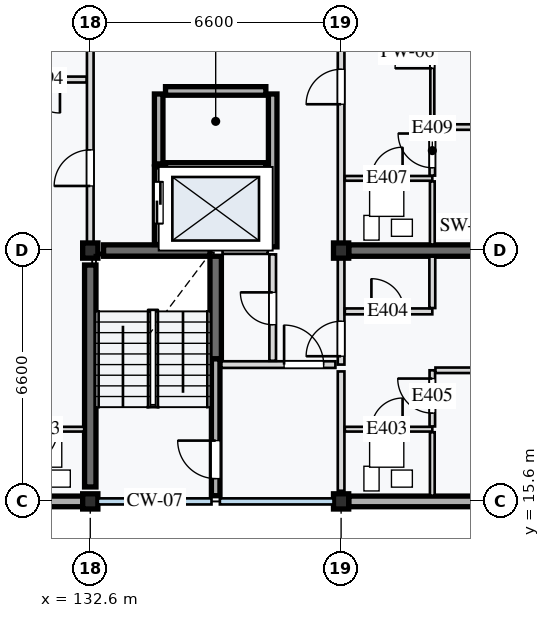
"""IFC4 building model, lengths in metres.
Left out: names, types, materials, properties, quantities, classifications, styles, units other than length and angle.
Written with IfcOpenShell. Run it as: python <this file> out.ifc"""

import sys

from ifc_helpers import new_model, si_unit, direction, frame, frame_2d, origin, origin_2d, place, context, subcontext, project, spatial, rectangle, extrude, element, fill, save


model = new_model("IFC4")
c1 = context("Model", 3, precision=1e-05, world=origin(), true_north=direction((0.0, 1.0)))
c2 = subcontext(c1, "Body", "Model", "MODEL_VIEW")
j1 = project(units=[si_unit("LENGTHUNIT", "METRE"), si_unit("PLANEANGLEUNIT", "RADIAN")], contexts=[c1])
p1 = place(None, origin())
s1 = spatial("IfcSite", under=j1, at=p1, CompositionType="ELEMENT")
p2 = place(p1, origin())
s2 = spatial("IfcBuilding", under=s1, at=p2, CompositionType="ELEMENT")
p3 = place(p2, frame((0.0, 0.0, 34.0)))
s3 = spatial("IfcBuildingStorey", under=s2, at=p3, CompositionType="ELEMENT", Elevation=34.0)
for number, where, z_axis, x_axis in (
    (1, (132.6, 15.6, 0.0), (0.0, 0.0, 1.0), (1.0, 0.0, 0.0)),
    (2, (139.2, 15.6, 0.0), (0.0, 0.0, 1.0), (1.0, 0.0, 0.0)),
    (3, (132.6, 22.2, 0.0), (0.0, 0.0, 1.0), (1.0, 0.0, 0.0)),
    (4, (139.2, 22.2, 0.0), (0.0, 0.0, 1.0), (1.0, 0.0, 0.0)),
):
    element("IfcColumn", number, at=place(p3, frame(where, z_axis=z_axis, x_axis=x_axis)), inside=s3, PredefinedType="COLUMN", context=c2, shape_type="SweptSolid", body=[
        extrude(rectangle(XDim=0.4, YDim=0.4, at=origin_2d()), origin(), (0.0, 0.0, 1.0), 3.2),
    ])
p4 = place(p3, frame((132.6, 15.98, 0.0), z_axis=(0.0, 0.0, 1.0), x_axis=(0.0, 1.0, 0.0)))
e5 = element("IfcWall", 5, at=p4, inside=s3, PredefinedType="SHEAR", context=c2, shape_type="SweptSolid", body=[
    extrude(rectangle(XDim=5.84, YDim=0.3, at=frame_2d((2.92, 0.0))), origin(), (0.0, 0.0, 1.0), 2.97),
])
p5 = place(p3, frame((135.9, 19.35, 0.0), z_axis=(0.0, 0.0, 1.0), x_axis=(0.0, 1.0, 0.0)))
e6 = element("IfcWall", 6, at=p5, inside=s3, PredefinedType="SHEAR", context=c2, shape_type="SweptSolid", body=[
    extrude(rectangle(XDim=2.7, YDim=0.3, at=frame_2d((1.35, 0.0))), origin(), (0.0, 0.0, 1.0), 2.97),
])
p6 = place(p3, frame((132.95, 22.2, 0.0), z_axis=(0.0, 0.0, 1.0), x_axis=(1.0, 0.0, 0.0)))
e7 = element("IfcWall", 7, at=p6, inside=s3, PredefinedType="SHEAR", context=c2, shape_type="SweptSolid", body=[
    extrude(rectangle(XDim=2.8, YDim=0.3, at=frame_2d((1.4, 0.0))), origin(), (0.0, 0.0, 1.0), 2.97),
])
p7 = place(p3, frame((139.4, 22.2, 0.0), z_axis=(0.0, 0.0, 1.0), x_axis=(1.0, 0.0, 0.0)))
e8 = element("IfcWall", 8, at=p7, inside=s3, PredefinedType="SHEAR", context=c2, shape_type="SweptSolid", body=[
    extrude(rectangle(XDim=6.2, YDim=0.3, at=frame_2d((3.1, 0.0))), origin(), (0.0, 0.0, 1.0), 2.97),
])
p8 = place(p3, frame((126.2, 15.6, 0.0), z_axis=(0.0, 0.0, 1.0), x_axis=(1.0, 0.0, 0.0)))
e9 = element("IfcWall", 9, at=p8, inside=s3, PredefinedType="STANDARD", context=c2, shape_type="SweptSolid", body=[
    extrude(rectangle(XDim=6.2, YDim=0.28, at=frame_2d((3.1, 0.0))), origin(), (0.0, 0.0, 1.0), 2.65),
])
p9 = place(p3, frame((139.4, 15.6, 0.0), z_axis=(0.0, 0.0, 1.0), x_axis=(1.0, 0.0, 0.0)))
e10 = element("IfcWall", 10, at=p9, inside=s3, PredefinedType="STANDARD", context=c2, shape_type="SweptSolid", body=[
    extrude(rectangle(XDim=6.2, YDim=0.28, at=frame_2d((3.1, 0.0))), origin(), (0.0, 0.0, 1.0), 2.65),
])
p10 = place(p3, frame((135.9, 15.75, 0.0), z_axis=(0.0, 0.0, 1.0), x_axis=(0.0, 1.0, 0.0)))
e11 = element("IfcWall", 11, at=p10, inside=s3, PredefinedType="STANDARD", context=c2, shape_type="SweptSolid", body=[
    extrude(rectangle(XDim=3.6, YDim=0.225, at=frame_2d((1.8, 0.0))), origin(), (0.0, 0.0, 1.0), 2.935),
])
p11 = place(p10, frame((0.45, 0.0, 0.0)))
e12 = element("IfcOpeningElement", 12, at=p11, cuts=e11, PredefinedType="OPENING", context=c2, shape_type="SweptSolid", body=[
    extrude(rectangle(XDim=1.0, YDim=2.16, at=frame_2d((0.5, 1.08))), frame((0.0, 0.123, 0.0), z_axis=(0.0, -1.0, 0.0), x_axis=(1.0, 0.0, 0.0)), (0.0, 0.0, 1.0), 0.245),
])
p12 = place(p3, frame((136.05, 19.2, 0.0), z_axis=(0.0, 0.0, 1.0), x_axis=(1.0, 0.0, 0.0)))
e13 = element("IfcWall", 13, at=p12, inside=s3, PredefinedType="PARTITIONING", context=c2, shape_type="SweptSolid", body=[
    extrude(rectangle(XDim=3.0, YDim=0.175, at=frame_2d((1.5, 0.0))), origin(), (0.0, 0.0, 1.0), 2.935),
])
p13 = place(p12, frame((1.65, 0.0, 0.0)))
e14 = element("IfcOpeningElement", 14, at=p13, cuts=e13, PredefinedType="OPENING", context=c2, shape_type="SweptSolid", body=[
    extrude(rectangle(XDim=1.04, YDim=2.12, at=frame_2d((0.52, 1.06))), frame((0.0, 0.097, 0.0), z_axis=(0.0, -1.0, 0.0), x_axis=(1.0, 0.0, 0.0)), (0.0, 0.0, 1.0), 0.195),
])
p14 = place(p3, frame((137.4, 19.3, 0.0), z_axis=(0.0, 0.0, 1.0), x_axis=(0.0, 1.0, 0.0)))
e15 = element("IfcWall", 15, at=p14, inside=s3, PredefinedType="PARTITIONING", context=c2, shape_type="SweptSolid", body=[
    extrude(rectangle(XDim=2.8, YDim=0.175, at=frame_2d((1.4, 0.0))), origin(), (0.0, 0.0, 1.0), 2.935),
])
p15 = place(p14, frame((0.95, 0.0, 0.0)))
e16 = element("IfcOpeningElement", 16, at=p15, cuts=e15, PredefinedType="OPENING", context=c2, shape_type="SweptSolid", body=[
    extrude(rectangle(XDim=0.85, YDim=2.0, at=frame_2d((0.425, 1.0))), frame((0.0, 0.097, 0.0), z_axis=(0.0, -1.0, 0.0), x_axis=(1.0, 0.0, 0.0)), (0.0, 0.0, 1.0), 0.195),
])
p16 = place(p3, frame((136.08, 22.2, 0.0), z_axis=(0.0, 0.0, 1.0), x_axis=(1.0, 0.0, 0.0)))
e17 = element("IfcWall", 17, at=p16, inside=s3, PredefinedType="PARTITIONING", context=c2, shape_type="SweptSolid", body=[
    extrude(rectangle(XDim=1.19, YDim=0.175, at=frame_2d((0.595, 0.0))), origin(), (0.0, 0.0, 1.0), 2.935),
])
p17 = place(p3, frame((134.4, 22.36, 0.0), z_axis=(0.0, 0.0, 1.0), x_axis=(0.0, 1.0, 0.0)))
e18 = element("IfcWall", 18, at=p17, inside=s3, PredefinedType="STANDARD", context=c2, shape_type="SweptSolid", body=[
    extrude(rectangle(XDim=2.04, YDim=0.225, at=frame_2d((1.02, 0.0))), origin(), (0.0, 0.0, 1.0), 2.935),
])
p18 = place(p17, frame((0.55, 0.0, 0.0)))
e19 = element("IfcOpeningElement", 19, at=p18, cuts=e18, PredefinedType="OPENING", context=c2, shape_type="SweptSolid", body=[
    extrude(rectangle(XDim=1.1, YDim=2.1, at=frame_2d((0.55, 1.05))), frame((0.0, 0.123, 0.0), z_axis=(0.0, -1.0, 0.0), x_axis=(1.0, 0.0, 0.0)), (0.0, 0.0, 1.0), 0.245),
])
p19 = place(p3, frame((134.4, 24.48, 0.0), z_axis=(0.0, 0.0, 1.0), x_axis=(0.0, 1.0, 0.0)))
e20 = element("IfcWall", 20, at=p19, inside=s3, PredefinedType="STANDARD", context=c2, shape_type="SweptSolid", body=[
    extrude(rectangle(XDim=1.84, YDim=0.225, at=frame_2d((0.92, 0.0))), origin(), (0.0, 0.0, 1.0), 2.935),
])
p20 = place(p3, frame((137.4, 22.298, 0.0), z_axis=(0.0, 0.0, 1.0), x_axis=(0.0, 1.0, 0.0)))
e21 = element("IfcWall", 21, at=p20, inside=s3, PredefinedType="STANDARD", context=c2, shape_type="SweptSolid", body=[
    extrude(rectangle(XDim=4.022, YDim=0.225, at=frame_2d((2.011, 0.0))), origin(), (0.0, 0.0, 1.0), 2.935),
])
for number, where, z_axis, x_axis in (
    (22, (134.58, 24.4, 0.0), (0.0, 0.0, 1.0), (1.0, 0.0, 0.0)),
    (23, (134.58, 26.4, 0.0), (0.0, 0.0, 1.0), (1.0, 0.0, 0.0)),
):
    element("IfcWall", number, at=place(p3, frame(where, z_axis=z_axis, x_axis=x_axis)), inside=s3, PredefinedType="STANDARD", context=c2, shape_type="SweptSolid", body=[
        extrude(rectangle(XDim=2.64, YDim=0.225, at=frame_2d((1.32, 0.0))), origin(), (0.0, 0.0, 1.0), 2.935),
    ])
p21 = place(p3, frame((132.6, 22.2, 0.0), z_axis=(0.0, 0.0, 1.0), x_axis=(0.0, 1.0, 0.0)))
e24 = element("IfcWall", 24, at=p21, inside=s3, PredefinedType="PARTITIONING", context=c2, shape_type="SweptSolid", body=[
    extrude(rectangle(XDim=6.6, YDim=0.175, at=frame_2d((3.3, 0.0))), origin(), (0.0, 0.0, 1.0), 2.7),
])
p22 = place(p21, frame((1.7, 0.0, 0.0)))
e25 = element("IfcOpeningElement", 25, at=p22, cuts=e24, PredefinedType="OPENING", context=c2, shape_type="SweptSolid", body=[
    extrude(rectangle(XDim=0.95, YDim=2.1, at=frame_2d((0.475, 1.05))), frame((0.0, 0.097, 0.0), z_axis=(0.0, -1.0, 0.0), x_axis=(1.0, 0.0, 0.0)), (0.0, 0.0, 1.0), 0.195),
])
p23 = place(p3, frame((132.44, 17.5, 0.0), z_axis=(0.0, 0.0, 1.0), x_axis=(-1.0, 0.0, 0.0)))
e26 = element("IfcWall", 26, at=p23, inside=s3, PredefinedType="PARTITIONING", context=c2, shape_type="SweptSolid", body=[
    extrude(rectangle(XDim=2.24, YDim=0.125, at=frame_2d((1.12, 0.0))), origin(), (0.0, 0.0, 1.0), 2.935),
])
p24 = place(p23, frame((0.7, 0.0, 0.0)))
e27 = element("IfcOpeningElement", 27, at=p24, cuts=e26, PredefinedType="OPENING", context=c2, shape_type="SweptSolid", body=[
    extrude(rectangle(XDim=0.94, YDim=2.08, at=frame_2d((0.47, 1.04))), frame((0.0, 0.073, 0.0), z_axis=(0.0, -1.0, 0.0), x_axis=(1.0, 0.0, 0.0)), (0.0, 0.0, 1.0), 0.145),
])
p25 = place(p3, frame((132.502, 26.7, 0.0), z_axis=(0.0, 0.0, 1.0), x_axis=(-1.0, 0.0, 0.0)))
e28 = element("IfcWall", 28, at=p25, inside=s3, PredefinedType="PARTITIONING", context=c2, shape_type="SweptSolid", body=[
    extrude(rectangle(XDim=2.302, YDim=0.155, at=frame_2d((1.151, 0.0))), origin(), (0.0, 0.0, 1.0), 2.935),
])
p26 = place(p25, frame((0.7, 0.0, 0.0)))
e29 = element("IfcOpeningElement", 29, at=p26, cuts=e28, PredefinedType="OPENING", context=c2, shape_type="SweptSolid", body=[
    extrude(rectangle(XDim=0.88, YDim=2.16, at=frame_2d((0.44, 1.08))), frame((0.0, 0.087, 0.0), z_axis=(0.0, -1.0, 0.0), x_axis=(1.0, 0.0, 0.0)), (0.0, 0.0, 1.0), 0.175),
])
p27 = place(p3, frame((139.2, 15.88, 0.0), z_axis=(0.0, 0.0, 1.0), x_axis=(0.0, 1.0, 0.0)))
e30 = element("IfcWall", 30, at=p27, inside=s3, PredefinedType="PARTITIONING", context=c2, shape_type="SweptSolid", body=[
    extrude(rectangle(XDim=3.14, YDim=0.175, at=frame_2d((1.57, 0.0))), origin(), (0.0, 0.0, 1.0), 2.7),
])
p28 = place(p3, frame((139.2, 19.2, 0.0), z_axis=(0.0, 0.0, 1.0), x_axis=(0.0, 1.0, 0.0)))
e31 = element("IfcWall", 31, at=p28, inside=s3, PredefinedType="PARTITIONING", context=c2, shape_type="SweptSolid", body=[
    extrude(rectangle(XDim=3.0, YDim=0.175, at=frame_2d((1.5, 0.0))), origin(), (0.0, 0.0, 1.0), 2.7),
])
p29 = place(p28, frame((0.22, 0.0, 0.0)))
e32 = element("IfcOpeningElement", 32, at=p29, cuts=e31, PredefinedType="OPENING", context=c2, shape_type="SweptSolid", body=[
    extrude(rectangle(XDim=0.92, YDim=2.14, at=frame_2d((0.46, 1.07))), frame((0.0, 0.097, 0.0), z_axis=(0.0, -1.0, 0.0), x_axis=(1.0, 0.0, 0.0)), (0.0, 0.0, 1.0), 0.195),
])
p30 = place(p3, frame((139.298, 17.5, 0.0), z_axis=(0.0, 0.0, 1.0), x_axis=(1.0, 0.0, 0.0)))
e33 = element("IfcWall", 33, at=p30, inside=s3, PredefinedType="PARTITIONING", context=c2, shape_type="SweptSolid", body=[
    extrude(rectangle(XDim=2.302, YDim=0.125, at=frame_2d((1.151, 0.0))), origin(), (0.0, 0.0, 1.0), 2.935),
])
p31 = place(p30, frame((0.7, 0.0, 0.0)))
e34 = element("IfcOpeningElement", 34, at=p31, cuts=e33, PredefinedType="OPENING", context=c2, shape_type="SweptSolid", body=[
    extrude(rectangle(XDim=0.82, YDim=2.05, at=frame_2d((0.41, 1.025))), frame((0.0, 0.073, 0.0), z_axis=(0.0, -1.0, 0.0), x_axis=(1.0, 0.0, 0.0)), (0.0, 0.0, 1.0), 0.145),
])
p32 = place(p3, frame((141.6, 15.75, 0.0), z_axis=(0.0, 0.0, 1.0), x_axis=(0.0, 1.0, 0.0)))
e35 = element("IfcWall", 35, at=p32, inside=s3, PredefinedType="PARTITIONING", context=c2, shape_type="SweptSolid", body=[
    extrude(rectangle(XDim=1.67, YDim=0.125, at=frame_2d((0.835, 0.0))), origin(), (0.0, 0.0, 1.0), 2.935),
])
p33 = place(p3, frame((139.298, 20.6, 0.0), z_axis=(0.0, 0.0, 1.0), x_axis=(1.0, 0.0, 0.0)))
e36 = element("IfcWall", 36, at=p33, inside=s3, PredefinedType="PARTITIONING", context=c2, shape_type="SweptSolid", body=[
    extrude(rectangle(XDim=2.302, YDim=0.155, at=frame_2d((1.151, 0.0))), origin(), (0.0, 0.0, 1.0), 2.935),
])
p34 = place(p33, frame((0.7, 0.0, 0.0)))
e37 = element("IfcOpeningElement", 37, at=p34, cuts=e36, PredefinedType="OPENING", context=c2, shape_type="SweptSolid", body=[
    extrude(rectangle(XDim=0.86, YDim=2.12, at=frame_2d((0.43, 1.06))), frame((0.0, 0.087, 0.0), z_axis=(0.0, -1.0, 0.0), x_axis=(1.0, 0.0, 0.0)), (0.0, 0.0, 1.0), 0.175),
])
p35 = place(p3, frame((141.6, 20.688, 0.0), z_axis=(0.0, 0.0, 1.0), x_axis=(0.0, 1.0, 0.0)))
e38 = element("IfcWall", 38, at=p35, inside=s3, PredefinedType="PARTITIONING", context=c2, shape_type="SweptSolid", body=[
    extrude(rectangle(XDim=1.353, YDim=0.155, at=frame_2d((0.676, 0.0))), origin(), (0.0, 0.0, 1.0), 2.935),
])
p36 = place(p3, frame((141.6, 17.573, 0.0), z_axis=(0.0, 0.0, 1.0), x_axis=(0.0, 1.0, 0.0)))
e39 = element("IfcWall", 39, at=p36, inside=s3, PredefinedType="PARTITIONING", context=c2, shape_type="SweptSolid", body=[
    extrude(rectangle(XDim=1.478, YDim=0.145, at=frame_2d((0.739, 0.0))), origin(), (0.0, 0.0, 1.0), 2.935),
])
p37 = place(p36, frame((0.35, 0.0, 0.0)))
e40 = element("IfcOpeningElement", 40, at=p37, cuts=e39, PredefinedType="OPENING", context=c2, shape_type="SweptSolid", body=[
    extrude(rectangle(XDim=0.91, YDim=2.14, at=frame_2d((0.455, 1.07))), frame((0.0, 0.083, 0.0), z_axis=(0.0, -1.0, 0.0), x_axis=(1.0, 0.0, 0.0)), (0.0, 0.0, 1.0), 0.165),
])
p38 = place(p3, frame((141.683, 19.05, 0.0), z_axis=(0.0, 0.0, 1.0), x_axis=(1.0, 0.0, 0.0)))
e41 = element("IfcWall", 41, at=p38, inside=s3, PredefinedType="PARTITIONING", context=c2, shape_type="SweptSolid", body=[
    extrude(rectangle(XDim=3.967, YDim=0.145, at=frame_2d((1.984, 0.0))), origin(), (0.0, 0.0, 1.0), 2.935),
])
p39 = place(p3, frame((139.2, 22.2, 0.0), z_axis=(0.0, 0.0, 1.0), x_axis=(0.0, 1.0, 0.0)))
e42 = element("IfcWall", 42, at=p39, inside=s3, PredefinedType="PARTITIONING", context=c2, shape_type="SweptSolid", body=[
    extrude(rectangle(XDim=6.6, YDim=0.175, at=frame_2d((3.3, 0.0))), origin(), (0.0, 0.0, 1.0), 2.7),
])
p40 = place(p39, frame((3.85, 0.0, 0.0)))
e43 = element("IfcOpeningElement", 43, at=p40, cuts=e42, PredefinedType="OPENING", context=c2, shape_type="SweptSolid", body=[
    extrude(rectangle(XDim=0.92, YDim=2.14, at=frame_2d((0.46, 1.07))), frame((0.0, 0.097, 0.0), z_axis=(0.0, -1.0, 0.0), x_axis=(1.0, 0.0, 0.0)), (0.0, 0.0, 1.0), 0.195),
])
p41 = place(p3, frame((139.298, 24.1, 0.0), z_axis=(0.0, 0.0, 1.0), x_axis=(1.0, 0.0, 0.0)))
e44 = element("IfcWall", 44, at=p41, inside=s3, PredefinedType="PARTITIONING", context=c2, shape_type="SweptSolid", body=[
    extrude(rectangle(XDim=2.302, YDim=0.125, at=frame_2d((1.151, 0.0))), origin(), (0.0, 0.0, 1.0), 2.935),
])
p42 = place(p41, frame((0.7, 0.0, 0.0)))
e45 = element("IfcOpeningElement", 45, at=p42, cuts=e44, PredefinedType="OPENING", context=c2, shape_type="SweptSolid", body=[
    extrude(rectangle(XDim=0.82, YDim=2.05, at=frame_2d((0.41, 1.025))), frame((0.0, 0.073, 0.0), z_axis=(0.0, -1.0, 0.0), x_axis=(1.0, 0.0, 0.0)), (0.0, 0.0, 1.0), 0.145),
])
p43 = place(p3, frame((141.6, 22.36, 0.0), z_axis=(0.0, 0.0, 1.0), x_axis=(0.0, 1.0, 0.0)))
e46 = element("IfcWall", 46, at=p43, inside=s3, PredefinedType="PARTITIONING", context=c2, shape_type="SweptSolid", body=[
    extrude(rectangle(XDim=1.66, YDim=0.125, at=frame_2d((0.83, 0.0))), origin(), (0.0, 0.0, 1.0), 2.935),
])
p44 = place(p3, frame((141.6, 24.173, 0.0), z_axis=(0.0, 0.0, 1.0), x_axis=(0.0, 1.0, 0.0)))
e47 = element("IfcWall", 47, at=p44, inside=s3, PredefinedType="PARTITIONING", context=c2, shape_type="SweptSolid", body=[
    extrude(rectangle(XDim=1.277, YDim=0.145, at=frame_2d((0.639, 0.0))), origin(), (0.0, 0.0, 1.0), 2.935),
])
p45 = place(p44, frame((0.208, 0.0, 0.0)))
e48 = element("IfcOpeningElement", 48, at=p45, cuts=e47, PredefinedType="OPENING", context=c2, shape_type="SweptSolid", body=[
    extrude(rectangle(XDim=0.9, YDim=2.16, at=frame_2d((0.45, 1.08))), frame((0.0, 0.083, 0.0), z_axis=(0.0, -1.0, 0.0), x_axis=(1.0, 0.0, 0.0)), (0.0, 0.0, 1.0), 0.165),
])
p46 = place(p3, frame((141.683, 25.45, 0.0), z_axis=(0.0, 0.0, 1.0), x_axis=(1.0, 0.0, 0.0)))
e49 = element("IfcWall", 49, at=p46, inside=s3, PredefinedType="PARTITIONING", context=c2, shape_type="SweptSolid", body=[
    extrude(rectangle(XDim=3.967, YDim=0.145, at=frame_2d((1.984, 0.0))), origin(), (0.0, 0.0, 1.0), 2.935),
])
p47 = place(p3, frame((141.6, 25.45, 0.0), z_axis=(0.0, 0.0, 1.0), x_axis=(0.0, 1.0, 0.0)))
e50 = element("IfcWall", 50, at=p47, inside=s3, PredefinedType="PARTITIONING", context=c2, shape_type="SweptSolid", body=[
    extrude(rectangle(XDim=3.942, YDim=0.105, at=frame_2d((1.971, 0.0))), origin(), (0.0, 0.0, 1.0), 2.935),
])
p48 = place(p47, frame((1.546, 0.0, 0.0)))
e51 = element("IfcOpeningElement", 51, at=p48, cuts=e50, PredefinedType="OPENING", context=c2, shape_type="SweptSolid", body=[
    extrude(rectangle(XDim=0.98, YDim=2.12, at=frame_2d((0.49, 1.06))), frame((0.0, 0.062, 0.0), z_axis=(0.0, -1.0, 0.0), x_axis=(1.0, 0.0, 0.0)), (0.0, 0.0, 1.0), 0.125),
])
p49 = place(p11, origin())
e52 = element("IfcDoor", 52, at=p49, inside=s3, OperationType="SINGLE_SWING_RIGHT", PredefinedType="DOOR", context=c2, shape_type="SweptSolid", body=[
    extrude(rectangle(XDim=1.0, YDim=2.16, at=frame_2d((0.5, 1.08))), frame((0.0, 0.025, 0.0), z_axis=(0.0, -1.0, 0.0), x_axis=(1.0, 0.0, 0.0)), (0.0, 0.0, 1.0), 0.05),
])
fill(e12, e52)
p50 = place(p13, origin())
e53 = element("IfcDoor", 53, at=p50, inside=s3, OperationType="SINGLE_SWING_LEFT", PredefinedType="DOOR", context=c2, shape_type="SweptSolid", body=[
    extrude(rectangle(XDim=1.04, YDim=2.12, at=frame_2d((0.52, 1.06))), frame((0.0, 0.025, 0.0), z_axis=(0.0, -1.0, 0.0), x_axis=(1.0, 0.0, 0.0)), (0.0, 0.0, 1.0), 0.05),
])
fill(e14, e53)
p51 = place(p15, origin())
e54 = element("IfcDoor", 54, at=p51, inside=s3, OperationType="SINGLE_SWING_RIGHT", PredefinedType="DOOR", context=c2, shape_type="SweptSolid", body=[
    extrude(rectangle(XDim=0.85, YDim=2.0, at=frame_2d((0.425, 1.0))), frame((0.0, 0.025, 0.0), z_axis=(0.0, -1.0, 0.0), x_axis=(1.0, 0.0, 0.0)), (0.0, 0.0, 1.0), 0.05),
])
fill(e16, e54)
p52 = place(p18, origin())
e55 = element("IfcDoor", 55, at=p52, inside=s3, OperationType="DOUBLE_DOOR_SLIDING", PredefinedType="DOOR", context=c2, shape_type="SweptSolid", body=[
    extrude(rectangle(XDim=1.1, YDim=2.1, at=frame_2d((0.55, 1.05))), frame((0.0, 0.025, 0.0), z_axis=(0.0, -1.0, 0.0), x_axis=(1.0, 0.0, 0.0)), (0.0, 0.0, 1.0), 0.05),
])
fill(e19, e55)
p53 = place(p22, origin())
e56 = element("IfcDoor", 56, at=p53, inside=s3, OperationType="SINGLE_SWING_LEFT", PredefinedType="DOOR", context=c2, shape_type="SweptSolid", body=[
    extrude(rectangle(XDim=0.95, YDim=2.1, at=frame_2d((0.475, 1.05))), frame((0.0, 0.025, 0.0), z_axis=(0.0, -1.0, 0.0), x_axis=(1.0, 0.0, 0.0)), (0.0, 0.0, 1.0), 0.05),
])
fill(e25, e56)
p54 = place(p24, origin())
e57 = element("IfcDoor", 57, at=p54, inside=s3, OperationType="SINGLE_SWING_RIGHT", PredefinedType="DOOR", context=c2, shape_type="SweptSolid", body=[
    extrude(rectangle(XDim=0.94, YDim=2.08, at=frame_2d((0.47, 1.04))), frame((0.0, 0.025, 0.0), z_axis=(0.0, -1.0, 0.0), x_axis=(1.0, 0.0, 0.0)), (0.0, 0.0, 1.0), 0.05),
])
fill(e27, e57)
p55 = place(p26, origin())
e58 = element("IfcDoor", 58, at=p55, inside=s3, OperationType="SINGLE_SWING_LEFT", PredefinedType="DOOR", context=c2, shape_type="SweptSolid", body=[
    extrude(rectangle(XDim=0.88, YDim=2.16, at=frame_2d((0.44, 1.08))), frame((0.0, 0.025, 0.0), z_axis=(0.0, -1.0, 0.0), x_axis=(1.0, 0.0, 0.0)), (0.0, 0.0, 1.0), 0.05),
])
fill(e29, e58)
p56 = place(p29, origin())
e59 = element("IfcDoor", 59, at=p56, inside=s3, OperationType="SINGLE_SWING_LEFT", PredefinedType="DOOR", context=c2, shape_type="SweptSolid", body=[
    extrude(rectangle(XDim=0.92, YDim=2.14, at=frame_2d((0.46, 1.07))), frame((0.0, 0.025, 0.0), z_axis=(0.0, -1.0, 0.0), x_axis=(1.0, 0.0, 0.0)), (0.0, 0.0, 1.0), 0.05),
])
fill(e32, e59)
p57 = place(p31, origin())
e60 = element("IfcDoor", 60, at=p57, inside=s3, OperationType="SINGLE_SWING_RIGHT", PredefinedType="DOOR", context=c2, shape_type="SweptSolid", body=[
    extrude(rectangle(XDim=0.82, YDim=2.05, at=frame_2d((0.41, 1.025))), frame((0.0, 0.025, 0.0), z_axis=(0.0, -1.0, 0.0), x_axis=(1.0, 0.0, 0.0)), (0.0, 0.0, 1.0), 0.05),
])
fill(e34, e60)
p58 = place(p34, origin())
e61 = element("IfcDoor", 61, at=p58, inside=s3, OperationType="SINGLE_SWING_LEFT", PredefinedType="DOOR", context=c2, shape_type="SweptSolid", body=[
    extrude(rectangle(XDim=0.86, YDim=2.12, at=frame_2d((0.43, 1.06))), frame((0.0, 0.025, 0.0), z_axis=(0.0, -1.0, 0.0), x_axis=(1.0, 0.0, 0.0)), (0.0, 0.0, 1.0), 0.05),
])
fill(e37, e61)
p59 = place(p37, origin())
e62 = element("IfcDoor", 62, at=p59, inside=s3, OperationType="SINGLE_SWING_RIGHT", PredefinedType="DOOR", context=c2, shape_type="SweptSolid", body=[
    extrude(rectangle(XDim=0.91, YDim=2.14, at=frame_2d((0.455, 1.07))), frame((0.0, 0.025, 0.0), z_axis=(0.0, -1.0, 0.0), x_axis=(1.0, 0.0, 0.0)), (0.0, 0.0, 1.0), 0.05),
])
fill(e40, e62)
p60 = place(p40, origin())
e63 = element("IfcDoor", 63, at=p60, inside=s3, OperationType="SINGLE_SWING_LEFT", PredefinedType="DOOR", context=c2, shape_type="SweptSolid", body=[
    extrude(rectangle(XDim=0.92, YDim=2.14, at=frame_2d((0.46, 1.07))), frame((0.0, 0.025, 0.0), z_axis=(0.0, -1.0, 0.0), x_axis=(1.0, 0.0, 0.0)), (0.0, 0.0, 1.0), 0.05),
])
fill(e43, e63)
p61 = place(p42, origin())
e64 = element("IfcDoor", 64, at=p61, inside=s3, OperationType="SINGLE_SWING_RIGHT", PredefinedType="DOOR", context=c2, shape_type="SweptSolid", body=[
    extrude(rectangle(XDim=0.82, YDim=2.05, at=frame_2d((0.41, 1.025))), frame((0.0, 0.025, 0.0), z_axis=(0.0, -1.0, 0.0), x_axis=(1.0, 0.0, 0.0)), (0.0, 0.0, 1.0), 0.05),
])
fill(e45, e64)
p62 = place(p45, origin())
e65 = element("IfcDoor", 65, at=p62, inside=s3, OperationType="SINGLE_SWING_RIGHT", PredefinedType="DOOR", context=c2, shape_type="SweptSolid", body=[
    extrude(rectangle(XDim=0.9, YDim=2.16, at=frame_2d((0.45, 1.08))), frame((0.0, 0.025, 0.0), z_axis=(0.0, -1.0, 0.0), x_axis=(1.0, 0.0, 0.0)), (0.0, 0.0, 1.0), 0.05),
])
fill(e48, e65)
p63 = place(p48, origin())
e66 = element("IfcDoor", 66, at=p63, inside=s3, OperationType="SINGLE_SWING_LEFT", PredefinedType="DOOR", context=c2, shape_type="SweptSolid", body=[
    extrude(rectangle(XDim=0.98, YDim=2.12, at=frame_2d((0.49, 1.06))), frame((0.0, 0.025, 0.0), z_axis=(0.0, -1.0, 0.0), x_axis=(1.0, 0.0, 0.0)), (0.0, 0.0, 1.0), 0.05),
])
fill(e51, e66)
save(model, sys.argv[1])
